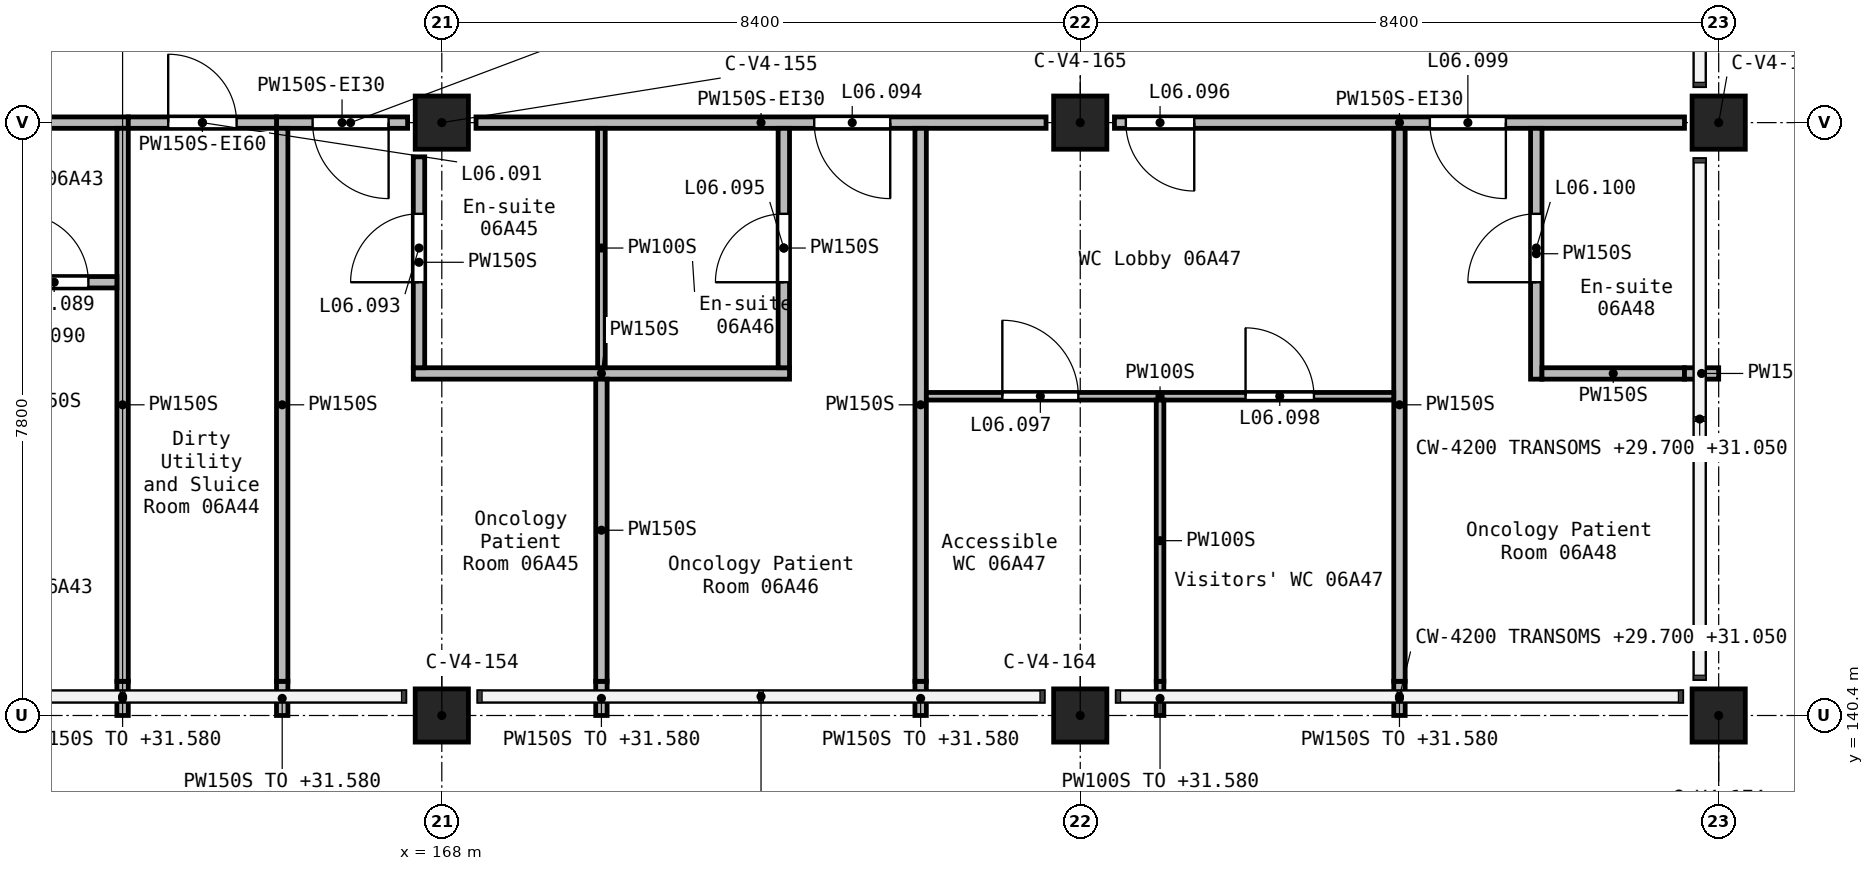
"""IFC4 building model, lengths in metres.
Left out: names, types, materials, properties, quantities, classifications, styles, units other than length and angle.
Written with IfcOpenShell. Run it as: python <this file> out.ifc"""

import sys

from ifc_helpers import new_model, si_unit, direction, frame, frame_2d, origin, origin_2d, place, context, subcontext, project, spatial, rectangle, extrude, element, fill, save


model = new_model("IFC4")
c1 = context("Model", 3, precision=1e-05, world=origin(), true_north=direction((0.0, 1.0)))
c2 = subcontext(c1, "Body", "Model", "MODEL_VIEW")
j1 = project(units=[si_unit("LENGTHUNIT", "METRE"), si_unit("PLANEANGLEUNIT", "RADIAN")], contexts=[c1])
p1 = place(None, origin())
s1 = spatial("IfcSite", under=j1, at=p1, CompositionType="ELEMENT")
p2 = place(p1, origin())
s2 = spatial("IfcBuilding", under=s1, at=p2, CompositionType="ELEMENT")
p3 = place(p2, frame((0.0, 0.0, 28.8)))
s3 = spatial("IfcBuildingStorey", under=s2, at=p3, CompositionType="ELEMENT", Elevation=28.8)
for number, where, z_axis, x_axis in (
    (1, (168.0, 140.4, 0.0), (0.0, 0.0, 1.0), (1.0, 0.0, 0.0)),
    (2, (168.0, 148.2, 0.0), (0.0, 0.0, 1.0), (1.0, 0.0, 0.0)),
    (3, (176.4, 140.4, 0.0), (0.0, 0.0, 1.0), (1.0, 0.0, 0.0)),
    (4, (176.4, 148.2, 0.0), (0.0, 0.0, 1.0), (1.0, 0.0, 0.0)),
    (5, (184.8, 140.4, 0.0), (0.0, 0.0, 1.0), (1.0, 0.0, 0.0)),
    (6, (184.8, 148.2, 0.0), (0.0, 0.0, 1.0), (1.0, 0.0, 0.0)),
):
    element("IfcColumn", number, at=place(p3, frame(where, z_axis=z_axis, x_axis=x_axis)), inside=s3, PredefinedType="COLUMN", context=c2, shape_type="SweptSolid", body=[
        extrude(rectangle(XDim=0.7, YDim=0.7, at=origin_2d()), origin(), (0.0, 0.0, 1.0), 3.9),
    ])
p4 = place(p3, frame((184.35, 148.2, 0.0), z_axis=(0.0, 0.0, 1.0), x_axis=(-1.0, 0.0, 0.0)))
e7 = element("IfcWall", 7, at=p4, inside=s3, PredefinedType="PARTITIONING", context=c2, shape_type="SweptSolid", body=[
    extrude(rectangle(XDim=7.5, YDim=0.15, at=frame_2d((3.75, 0.0))), origin(), (0.0, 0.0, 1.0), 3.6),
])
p5 = place(p4, frame((6.45, 0.0, 0.0)))
e8 = element("IfcOpeningElement", 8, at=p5, cuts=e7, PredefinedType="OPENING", context=c2, shape_type="SweptSolid", body=[
    extrude(rectangle(XDim=0.9, YDim=2.1, at=frame_2d((0.45, 1.05))), frame((0.0, 0.085, 0.0), z_axis=(0.0, -1.0, 0.0), x_axis=(1.0, 0.0, 0.0)), (0.0, 0.0, 1.0), 0.17),
])
p6 = place(p4, frame((2.35, 0.0, 0.0)))
e9 = element("IfcOpeningElement", 9, at=p6, cuts=e7, PredefinedType="OPENING", context=c2, shape_type="SweptSolid", body=[
    extrude(rectangle(XDim=1.0, YDim=2.1, at=frame_2d((0.5, 1.05))), frame((0.0, 0.085, 0.0), z_axis=(0.0, -1.0, 0.0), x_axis=(1.0, 0.0, 0.0)), (0.0, 0.0, 1.0), 0.17),
])
p7 = place(p3, frame((175.95, 148.2, 0.0), z_axis=(0.0, 0.0, 1.0), x_axis=(-1.0, 0.0, 0.0)))
e10 = element("IfcWall", 10, at=p7, inside=s3, PredefinedType="PARTITIONING", context=c2, shape_type="SweptSolid", body=[
    extrude(rectangle(XDim=7.5, YDim=0.15, at=frame_2d((3.75, 0.0))), origin(), (0.0, 0.0, 1.0), 3.6),
])
p8 = place(p7, frame((2.05, 0.0, 0.0)))
e11 = element("IfcOpeningElement", 11, at=p8, cuts=e10, PredefinedType="OPENING", context=c2, shape_type="SweptSolid", body=[
    extrude(rectangle(XDim=1.0, YDim=2.1, at=frame_2d((0.5, 1.05))), frame((0.0, 0.085, 0.0), z_axis=(0.0, -1.0, 0.0), x_axis=(1.0, 0.0, 0.0)), (0.0, 0.0, 1.0), 0.17),
])
p9 = place(p3, frame((167.55, 148.2, 0.0), z_axis=(0.0, 0.0, 1.0), x_axis=(-1.0, 0.0, 0.0)))
e12 = element("IfcWall", 12, at=p9, inside=s3, PredefinedType="PARTITIONING", context=c2, shape_type="SweptSolid", body=[
    extrude(rectangle(XDim=1.725, YDim=0.15, at=frame_2d((0.863, 0.0))), origin(), (0.0, 0.0, 1.0), 3.6),
])
p10 = place(p9, frame((0.25, 0.0, 0.0)))
e13 = element("IfcOpeningElement", 13, at=p10, cuts=e12, PredefinedType="OPENING", context=c2, shape_type="SweptSolid", body=[
    extrude(rectangle(XDim=1.0, YDim=2.1, at=frame_2d((0.5, 1.05))), frame((0.0, 0.085, 0.0), z_axis=(0.0, -1.0, 0.0), x_axis=(1.0, 0.0, 0.0)), (0.0, 0.0, 1.0), 0.17),
])
p11 = place(p3, frame((160.05, 148.2, 0.0), z_axis=(0.0, 0.0, 1.0), x_axis=(1.0, 0.0, 0.0)))
e14 = element("IfcWall", 14, at=p11, inside=s3, PredefinedType="PARTITIONING", context=c2, shape_type="SweptSolid", body=[
    extrude(rectangle(XDim=3.825, YDim=0.15, at=frame_2d((1.913, 0.0))), origin(), (0.0, 0.0, 1.0), 3.6),
])
p12 = place(p11, frame((1.2, 0.0, 0.0)))
e15 = element("IfcOpeningElement", 15, at=p12, cuts=e14, PredefinedType="OPENING", context=c2, shape_type="SweptSolid", body=[
    extrude(rectangle(XDim=0.9, YDim=2.1, at=frame_2d((0.45, 1.05))), frame((0.0, 0.085, 0.0), z_axis=(0.0, -1.0, 0.0), x_axis=(1.0, 0.0, 0.0)), (0.0, 0.0, 1.0), 0.17),
])
p13 = place(p3, frame((163.875, 148.2, 0.0), z_axis=(0.0, 0.0, 1.0), x_axis=(1.0, 0.0, 0.0)))
e16 = element("IfcWall", 16, at=p13, inside=s3, PredefinedType="PARTITIONING", context=c2, shape_type="SweptSolid", body=[
    extrude(rectangle(XDim=1.95, YDim=0.15, at=frame_2d((0.975, 0.0))), origin(), (0.0, 0.0, 1.0), 3.6),
])
p14 = place(p13, frame((0.525, 0.0, 0.0)))
e17 = element("IfcOpeningElement", 17, at=p14, cuts=e16, PredefinedType="OPENING", context=c2, shape_type="SweptSolid", body=[
    extrude(rectangle(XDim=0.9, YDim=2.1, at=frame_2d((0.45, 1.05))), frame((0.0, 0.085, 0.0), z_axis=(0.0, -1.0, 0.0), x_axis=(1.0, 0.0, 0.0)), (0.0, 0.0, 1.0), 0.17),
])
p15 = place(p3, frame((163.8, 140.4, 0.0), z_axis=(0.0, 0.0, 1.0), x_axis=(0.0, 1.0, 0.0)))
e18 = element("IfcWall", 18, at=p15, inside=s3, PredefinedType="PARTITIONING", context=c2, shape_type="SweptSolid", body=[
    extrude(rectangle(XDim=0.45, YDim=0.15, at=frame_2d((0.225, 0.0))), origin(), (0.0, 0.0, 1.0), 2.78),
])
p16 = place(p3, frame((163.8, 140.85, 0.0), z_axis=(0.0, 0.0, 1.0), x_axis=(0.0, 1.0, 0.0)))
e19 = element("IfcWall", 19, at=p16, inside=s3, PredefinedType="PARTITIONING", context=c2, shape_type="SweptSolid", body=[
    extrude(rectangle(XDim=7.275, YDim=0.15, at=frame_2d((3.637, 0.0))), origin(), (0.0, 0.0, 1.0), 3.6),
])
p17 = place(p3, frame((165.9, 140.4, 0.0), z_axis=(0.0, 0.0, 1.0), x_axis=(0.0, 1.0, 0.0)))
e20 = element("IfcWall", 20, at=p17, inside=s3, PredefinedType="PARTITIONING", context=c2, shape_type="SweptSolid", body=[
    extrude(rectangle(XDim=0.45, YDim=0.15, at=frame_2d((0.225, 0.0))), origin(), (0.0, 0.0, 1.0), 2.78),
])
p18 = place(p3, frame((165.9, 140.85, 0.0), z_axis=(0.0, 0.0, 1.0), x_axis=(0.0, 1.0, 0.0)))
e21 = element("IfcWall", 21, at=p18, inside=s3, PredefinedType="PARTITIONING", context=c2, shape_type="SweptSolid", body=[
    extrude(rectangle(XDim=7.275, YDim=0.15, at=frame_2d((3.637, 0.0))), origin(), (0.0, 0.0, 1.0), 3.6),
])
p19 = place(p3, frame((174.3, 140.4, 0.0), z_axis=(0.0, 0.0, 1.0), x_axis=(0.0, 1.0, 0.0)))
e22 = element("IfcWall", 22, at=p19, inside=s3, PredefinedType="PARTITIONING", context=c2, shape_type="SweptSolid", body=[
    extrude(rectangle(XDim=0.45, YDim=0.15, at=frame_2d((0.225, 0.0))), origin(), (0.0, 0.0, 1.0), 2.78),
])
p20 = place(p3, frame((174.3, 140.85, 0.0), z_axis=(0.0, 0.0, 1.0), x_axis=(0.0, 1.0, 0.0)))
e23 = element("IfcWall", 23, at=p20, inside=s3, PredefinedType="PARTITIONING", context=c2, shape_type="SweptSolid", body=[
    extrude(rectangle(XDim=7.275, YDim=0.15, at=frame_2d((3.637, 0.0))), origin(), (0.0, 0.0, 1.0), 3.6),
])
p21 = place(p3, frame((180.6, 140.4, 0.0), z_axis=(0.0, 0.0, 1.0), x_axis=(0.0, 1.0, 0.0)))
e24 = element("IfcWall", 24, at=p21, inside=s3, PredefinedType="PARTITIONING", context=c2, shape_type="SweptSolid", body=[
    extrude(rectangle(XDim=0.45, YDim=0.15, at=frame_2d((0.225, 0.0))), origin(), (0.0, 0.0, 1.0), 2.78),
])
p22 = place(p3, frame((180.6, 140.85, 0.0), z_axis=(0.0, 0.0, 1.0), x_axis=(0.0, 1.0, 0.0)))
e25 = element("IfcWall", 25, at=p22, inside=s3, PredefinedType="PARTITIONING", context=c2, shape_type="SweptSolid", body=[
    extrude(rectangle(XDim=7.275, YDim=0.15, at=frame_2d((3.637, 0.0))), origin(), (0.0, 0.0, 1.0), 3.6),
])
p23 = place(p3, frame((167.625, 144.9, 0.0), z_axis=(0.0, 0.0, 1.0), x_axis=(1.0, 0.0, 0.0)))
e26 = element("IfcWall", 26, at=p23, inside=s3, PredefinedType="PARTITIONING", context=c2, shape_type="SweptSolid", body=[
    extrude(rectangle(XDim=4.95, YDim=0.15, at=frame_2d((2.475, 0.0))), origin(), (0.0, 0.0, 1.0), 3.6),
])
p24 = place(p3, frame((170.1, 140.4, 0.0), z_axis=(0.0, 0.0, 1.0), x_axis=(0.0, 1.0, 0.0)))
e27 = element("IfcWall", 27, at=p24, inside=s3, PredefinedType="PARTITIONING", context=c2, shape_type="SweptSolid", body=[
    extrude(rectangle(XDim=0.45, YDim=0.15, at=frame_2d((0.225, 0.0))), origin(), (0.0, 0.0, 1.0), 2.78),
])
p25 = place(p3, frame((170.1, 140.85, 0.0), z_axis=(0.0, 0.0, 1.0), x_axis=(0.0, 1.0, 0.0)))
e28 = element("IfcWall", 28, at=p25, inside=s3, PredefinedType="PARTITIONING", context=c2, shape_type="SweptSolid", body=[
    extrude(rectangle(XDim=3.975, YDim=0.15, at=frame_2d((1.987, 0.0))), origin(), (0.0, 0.0, 1.0), 3.6),
])
p26 = place(p3, frame((159.7, 146.1, 0.0), z_axis=(0.0, 0.0, 1.0), x_axis=(1.0, 0.0, 0.0)))
e29 = element("IfcWall", 29, at=p26, inside=s3, PredefinedType="PARTITIONING", context=c2, shape_type="SweptSolid", body=[
    extrude(rectangle(XDim=4.025, YDim=0.15, at=frame_2d((2.013, 0.0))), origin(), (0.0, 0.0, 1.0), 3.6),
])
p27 = place(p26, frame((2.75, 0.0, 0.0)))
e30 = element("IfcOpeningElement", 30, at=p27, cuts=e29, PredefinedType="OPENING", context=c2, shape_type="SweptSolid", body=[
    extrude(rectangle(XDim=0.9, YDim=2.1, at=frame_2d((0.45, 1.05))), frame((0.0, 0.085, 0.0), z_axis=(0.0, -1.0, 0.0), x_axis=(1.0, 0.0, 0.0)), (0.0, 0.0, 1.0), 0.17),
])
p28 = place(p3, frame((167.7, 144.975, 0.0), z_axis=(0.0, 0.0, 1.0), x_axis=(0.0, 1.0, 0.0)))
e31 = element("IfcWall", 31, at=p28, inside=s3, PredefinedType="PARTITIONING", context=c2, shape_type="SweptSolid", body=[
    extrude(rectangle(XDim=2.775, YDim=0.15, at=frame_2d((1.387, 0.0))), origin(), (0.0, 0.0, 1.0), 3.6),
])
p29 = place(p28, frame((1.125, 0.0, 0.0)))
e32 = element("IfcOpeningElement", 32, at=p29, cuts=e31, PredefinedType="OPENING", context=c2, shape_type="SweptSolid", body=[
    extrude(rectangle(XDim=0.9, YDim=2.1, at=frame_2d((0.45, 1.05))), frame((0.0, 0.085, 0.0), z_axis=(0.0, -1.0, 0.0), x_axis=(1.0, 0.0, 0.0)), (0.0, 0.0, 1.0), 0.17),
])
p30 = place(p3, frame((172.5, 144.975, 0.0), z_axis=(0.0, 0.0, 1.0), x_axis=(0.0, 1.0, 0.0)))
e33 = element("IfcWall", 33, at=p30, inside=s3, PredefinedType="PARTITIONING", context=c2, shape_type="SweptSolid", body=[
    extrude(rectangle(XDim=3.15, YDim=0.15, at=frame_2d((1.575, 0.0))), origin(), (0.0, 0.0, 1.0), 3.6),
])
p31 = place(p30, frame((1.125, 0.0, 0.0)))
e34 = element("IfcOpeningElement", 34, at=p31, cuts=e33, PredefinedType="OPENING", context=c2, shape_type="SweptSolid", body=[
    extrude(rectangle(XDim=0.9, YDim=2.1, at=frame_2d((0.45, 1.05))), frame((0.0, 0.085, 0.0), z_axis=(0.0, -1.0, 0.0), x_axis=(1.0, 0.0, 0.0)), (0.0, 0.0, 1.0), 0.17),
])
p32 = place(p3, frame((182.4, 144.825, 0.0), z_axis=(0.0, 0.0, 1.0), x_axis=(0.0, 1.0, 0.0)))
e35 = element("IfcWall", 35, at=p32, inside=s3, PredefinedType="PARTITIONING", context=c2, shape_type="SweptSolid", body=[
    extrude(rectangle(XDim=3.3, YDim=0.15, at=frame_2d((1.65, 0.0))), origin(), (0.0, 0.0, 1.0), 3.6),
])
p33 = place(p32, frame((1.275, 0.0, 0.0)))
e36 = element("IfcOpeningElement", 36, at=p33, cuts=e35, PredefinedType="OPENING", context=c2, shape_type="SweptSolid", body=[
    extrude(rectangle(XDim=0.9, YDim=2.1, at=frame_2d((0.45, 1.05))), frame((0.0, 0.085, 0.0), z_axis=(0.0, -1.0, 0.0), x_axis=(1.0, 0.0, 0.0)), (0.0, 0.0, 1.0), 0.17),
])
p34 = place(p3, frame((182.475, 144.9, 0.0), z_axis=(0.0, 0.0, 1.0), x_axis=(1.0, 0.0, 0.0)))
e37 = element("IfcWall", 37, at=p34, inside=s3, PredefinedType="PARTITIONING", context=c2, shape_type="SweptSolid", body=[
    extrude(rectangle(XDim=1.875, YDim=0.15, at=frame_2d((0.938, 0.0))), origin(), (0.0, 0.0, 1.0), 3.6),
])
p35 = place(p3, frame((184.35, 144.9, 0.0), z_axis=(0.0, 0.0, 1.0), x_axis=(1.0, 0.0, 0.0)))
e38 = element("IfcWall", 38, at=p35, inside=s3, PredefinedType="PARTITIONING", context=c2, shape_type="SweptSolid", body=[
    extrude(rectangle(XDim=0.45, YDim=0.15, at=frame_2d((0.225, 0.0))), origin(), (0.0, 0.0, 1.0), 2.78),
])
p36 = place(p3, frame((174.375, 144.6, 0.0), z_axis=(0.0, 0.0, 1.0), x_axis=(1.0, 0.0, 0.0)))
e39 = element("IfcWall", 39, at=p36, inside=s3, PredefinedType="PARTITIONING", context=c2, shape_type="SweptSolid", body=[
    extrude(rectangle(XDim=6.15, YDim=0.1, at=frame_2d((3.075, 0.0))), origin(), (0.0, 0.0, 1.0), 3.6),
])
p37 = place(p36, frame((1.0, 0.0, 0.0)))
e40 = element("IfcOpeningElement", 40, at=p37, cuts=e39, PredefinedType="OPENING", context=c2, shape_type="SweptSolid", body=[
    extrude(rectangle(XDim=1.0, YDim=2.1, at=frame_2d((0.5, 1.05))), frame((0.0, 0.06, 0.0), z_axis=(0.0, -1.0, 0.0), x_axis=(1.0, 0.0, 0.0)), (0.0, 0.0, 1.0), 0.12),
])
p38 = place(p36, frame((4.2, 0.0, 0.0)))
e41 = element("IfcOpeningElement", 41, at=p38, cuts=e39, PredefinedType="OPENING", context=c2, shape_type="SweptSolid", body=[
    extrude(rectangle(XDim=0.9, YDim=2.1, at=frame_2d((0.45, 1.05))), frame((0.0, 0.06, 0.0), z_axis=(0.0, -1.0, 0.0), x_axis=(1.0, 0.0, 0.0)), (0.0, 0.0, 1.0), 0.12),
])
p39 = place(p3, frame((177.45, 140.4, 0.0), z_axis=(0.0, 0.0, 1.0), x_axis=(0.0, 1.0, 0.0)))
e42 = element("IfcWall", 42, at=p39, inside=s3, PredefinedType="PARTITIONING", context=c2, shape_type="SweptSolid", body=[
    extrude(rectangle(XDim=0.45, YDim=0.1, at=frame_2d((0.225, 0.0))), origin(), (0.0, 0.0, 1.0), 2.78),
])
p40 = place(p3, frame((177.45, 140.85, 0.0), z_axis=(0.0, 0.0, 1.0), x_axis=(0.0, 1.0, 0.0)))
e43 = element("IfcWall", 43, at=p40, inside=s3, PredefinedType="PARTITIONING", context=c2, shape_type="SweptSolid", body=[
    extrude(rectangle(XDim=3.7, YDim=0.1, at=frame_2d((1.85, 0.0))), origin(), (0.0, 0.0, 1.0), 3.6),
])
p41 = place(p3, frame((170.1, 144.975, 0.0), z_axis=(0.0, 0.0, 1.0), x_axis=(0.0, 1.0, 0.0)))
e44 = element("IfcWall", 44, at=p41, inside=s3, PredefinedType="PARTITIONING", context=c2, shape_type="SweptSolid", body=[
    extrude(rectangle(XDim=3.15, YDim=0.1, at=frame_2d((1.575, 0.0))), origin(), (0.0, 0.0, 1.0), 3.6),
])
p42 = place(p27, frame((0.9, 0.0, 0.0), z_axis=(0.0, 0.0, 1.0), x_axis=(-1.0, 0.0, 0.0)))
e45 = element("IfcDoor", 45, at=p42, inside=s3, OperationType="SINGLE_SWING_LEFT", PredefinedType="DOOR", context=c2, shape_type="SweptSolid", body=[
    extrude(rectangle(XDim=0.9, YDim=2.1, at=frame_2d((0.45, 1.05))), frame((0.0, 0.025, 0.0), z_axis=(0.0, -1.0, 0.0), x_axis=(1.0, 0.0, 0.0)), (0.0, 0.0, 1.0), 0.05),
])
fill(e30, e45)
p43 = place(p14, frame((0.9, 0.0, 0.0), z_axis=(0.0, 0.0, 1.0), x_axis=(-1.0, 0.0, 0.0)))
e46 = element("IfcDoor", 46, at=p43, inside=s3, OperationType="SINGLE_SWING_LEFT", PredefinedType="DOOR", context=c2, shape_type="SweptSolid", body=[
    extrude(rectangle(XDim=0.9, YDim=2.1, at=frame_2d((0.45, 1.05))), frame((0.0, 0.025, 0.0), z_axis=(0.0, -1.0, 0.0), x_axis=(1.0, 0.0, 0.0)), (0.0, 0.0, 1.0), 0.05),
])
fill(e17, e46)
p44 = place(p10, origin())
e47 = element("IfcDoor", 47, at=p44, inside=s3, OperationType="SINGLE_SWING_LEFT", PredefinedType="DOOR", context=c2, shape_type="SweptSolid", body=[
    extrude(rectangle(XDim=1.0, YDim=2.1, at=frame_2d((0.5, 1.05))), frame((0.0, 0.025, 0.0), z_axis=(0.0, -1.0, 0.0), x_axis=(1.0, 0.0, 0.0)), (0.0, 0.0, 1.0), 0.05),
])
fill(e13, e47)
p45 = place(p29, frame((0.9, 0.0, 0.0), z_axis=(0.0, 0.0, 1.0), x_axis=(-1.0, 0.0, 0.0)))
e48 = element("IfcDoor", 48, at=p45, inside=s3, OperationType="SINGLE_SWING_LEFT", PredefinedType="DOOR", context=c2, shape_type="SweptSolid", body=[
    extrude(rectangle(XDim=0.9, YDim=2.1, at=frame_2d((0.45, 1.05))), frame((0.0, 0.025, 0.0), z_axis=(0.0, -1.0, 0.0), x_axis=(1.0, 0.0, 0.0)), (0.0, 0.0, 1.0), 0.05),
])
fill(e32, e48)
p46 = place(p8, origin())
e49 = element("IfcDoor", 49, at=p46, inside=s3, OperationType="SINGLE_SWING_LEFT", PredefinedType="DOOR", context=c2, shape_type="SweptSolid", body=[
    extrude(rectangle(XDim=1.0, YDim=2.1, at=frame_2d((0.5, 1.05))), frame((0.0, 0.025, 0.0), z_axis=(0.0, -1.0, 0.0), x_axis=(1.0, 0.0, 0.0)), (0.0, 0.0, 1.0), 0.05),
])
fill(e11, e49)
p47 = place(p31, origin())
e50 = element("IfcDoor", 50, at=p47, inside=s3, OperationType="SINGLE_SWING_RIGHT", PredefinedType="DOOR", context=c2, shape_type="SweptSolid", body=[
    extrude(rectangle(XDim=0.9, YDim=2.1, at=frame_2d((0.45, 1.05))), frame((0.0, 0.025, 0.0), z_axis=(0.0, -1.0, 0.0), x_axis=(1.0, 0.0, 0.0)), (0.0, 0.0, 1.0), 0.05),
])
fill(e34, e50)
p48 = place(p5, origin())
e51 = element("IfcDoor", 51, at=p48, inside=s3, OperationType="SINGLE_SWING_RIGHT", PredefinedType="DOOR", context=c2, shape_type="SweptSolid", body=[
    extrude(rectangle(XDim=0.9, YDim=2.1, at=frame_2d((0.45, 1.05))), frame((0.0, 0.025, 0.0), z_axis=(0.0, -1.0, 0.0), x_axis=(1.0, 0.0, 0.0)), (0.0, 0.0, 1.0), 0.05),
])
fill(e8, e51)
p49 = place(p37, frame((1.0, 0.0, 0.0), z_axis=(0.0, 0.0, 1.0), x_axis=(-1.0, 0.0, 0.0)))
e52 = element("IfcDoor", 52, at=p49, inside=s3, OperationType="SINGLE_SWING_RIGHT", PredefinedType="DOOR", context=c2, shape_type="SweptSolid", body=[
    extrude(rectangle(XDim=1.0, YDim=2.1, at=frame_2d((0.5, 1.05))), frame((0.0, 0.025, 0.0), z_axis=(0.0, -1.0, 0.0), x_axis=(1.0, 0.0, 0.0)), (0.0, 0.0, 1.0), 0.05),
])
fill(e40, e52)
p50 = place(p38, frame((0.9, 0.0, 0.0), z_axis=(0.0, 0.0, 1.0), x_axis=(-1.0, 0.0, 0.0)))
e53 = element("IfcDoor", 53, at=p50, inside=s3, OperationType="SINGLE_SWING_LEFT", PredefinedType="DOOR", context=c2, shape_type="SweptSolid", body=[
    extrude(rectangle(XDim=0.9, YDim=2.1, at=frame_2d((0.45, 1.05))), frame((0.0, 0.025, 0.0), z_axis=(0.0, -1.0, 0.0), x_axis=(1.0, 0.0, 0.0)), (0.0, 0.0, 1.0), 0.05),
])
fill(e41, e53)
p51 = place(p6, origin())
e54 = element("IfcDoor", 54, at=p51, inside=s3, OperationType="SINGLE_SWING_LEFT", PredefinedType="DOOR", context=c2, shape_type="SweptSolid", body=[
    extrude(rectangle(XDim=1.0, YDim=2.1, at=frame_2d((0.5, 1.05))), frame((0.0, 0.025, 0.0), z_axis=(0.0, -1.0, 0.0), x_axis=(1.0, 0.0, 0.0)), (0.0, 0.0, 1.0), 0.05),
])
fill(e9, e54)
p52 = place(p33, frame((0.9, 0.0, 0.0), z_axis=(0.0, 0.0, 1.0), x_axis=(-1.0, 0.0, 0.0)))
e55 = element("IfcDoor", 55, at=p52, inside=s3, OperationType="SINGLE_SWING_LEFT", PredefinedType="DOOR", context=c2, shape_type="SweptSolid", body=[
    extrude(rectangle(XDim=0.9, YDim=2.1, at=frame_2d((0.45, 1.05))), frame((0.0, 0.025, 0.0), z_axis=(0.0, -1.0, 0.0), x_axis=(1.0, 0.0, 0.0)), (0.0, 0.0, 1.0), 0.05),
])
fill(e36, e55)
save(model, sys.argv[1])
